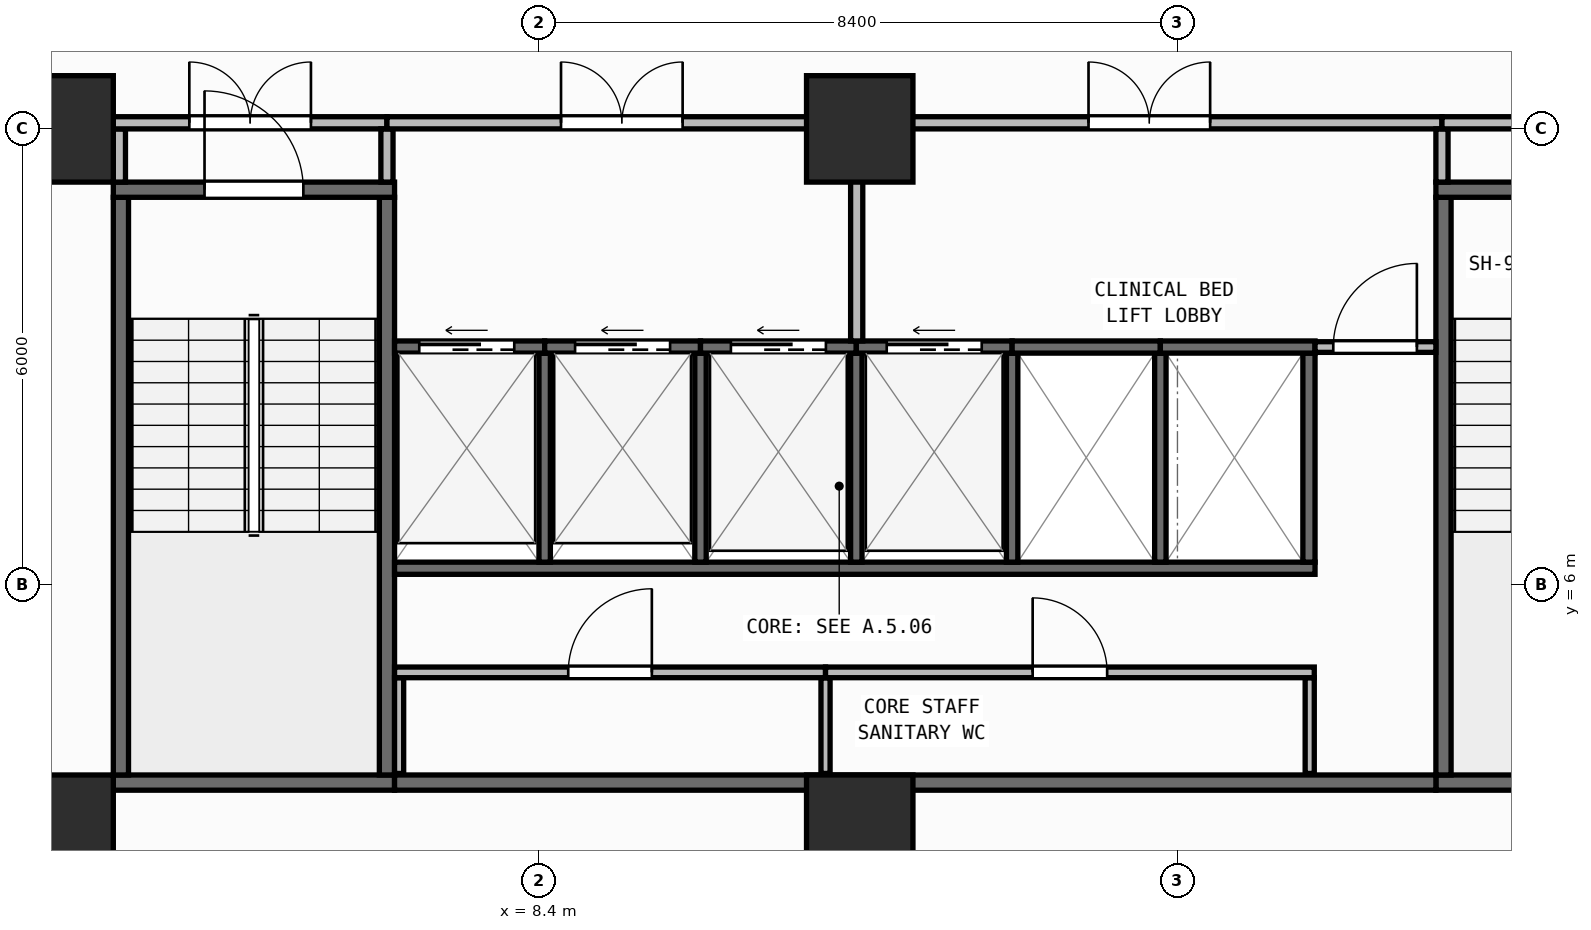
"""IFC4 building model, lengths in metres.
Left out: names, types, materials, properties, quantities, classifications, styles, units other than length and angle.
Written with IfcOpenShell. Run it as: python <this file> out.ifc"""

import sys

from ifc_helpers import new_model, si_unit, direction, frame, frame_2d, origin, origin_2d, place, context, subcontext, project, spatial, rectangle, extrude, element, fill, save


model = new_model("IFC4")
c1 = context("Model", 3, precision=1e-05, world=origin(), true_north=direction((0.0, 1.0)))
c2 = subcontext(c1, "Body", "Model", "MODEL_VIEW")
j1 = project(units=[si_unit("LENGTHUNIT", "METRE"), si_unit("PLANEANGLEUNIT", "RADIAN")], contexts=[c1])
p1 = place(None, origin())
s1 = spatial("IfcSite", under=j1, at=p1, CompositionType="ELEMENT")
p2 = place(p1, origin())
s2 = spatial("IfcBuilding", under=s1, at=p2, CompositionType="ELEMENT")
p3 = place(p2, frame((0.0, 0.0, 54.1)))
s3 = spatial("IfcBuildingStorey", under=s2, at=p3, CompositionType="ELEMENT", Elevation=54.1)
for number, where, z_axis, x_axis in (
    (1, (2.1, 2.8, 0.0), (0.0, 0.0, 1.0), (1.0, 0.0, 0.0)),
    (2, (12.62, 2.8, 0.0), (0.0, 0.0, 1.0), (1.0, 0.0, 0.0)),
    (3, (2.1, 12.0, 0.0), (0.0, 0.0, 1.0), (1.0, 0.0, 0.0)),
    (4, (12.62, 12.0, 0.0), (0.0, 0.0, 1.0), (1.0, 0.0, 0.0)),
):
    element("IfcColumn", number, at=place(p3, frame(where, z_axis=z_axis, x_axis=x_axis)), inside=s3, PredefinedType="COLUMN", context=c2, shape_type="SweptSolid", body=[
        extrude(rectangle(XDim=1.4, YDim=1.4, at=origin_2d()), origin(), (0.0, 0.0, 1.0), 3.95),
    ])
p4 = place(p3, frame((2.76, 0.174, 0.0), z_axis=(0.0, 0.0, 1.0), x_axis=(0.996571478456, 0.082736257641, 0.0)))
e5 = element("IfcWall", 5, at=p4, inside=s3, PredefinedType="STANDARD", context=c2, shape_type="SweptSolid", body=[
    extrude(rectangle(XDim=52.861, YDim=0.26, at=frame_2d((26.431, 0.0))), origin(), (0.0, 0.0, 1.0), 3.71),
])
p5 = place(p4, frame((25.231, 0.0, 0.9)))
e6 = element("IfcOpeningElement", 6, at=p5, cuts=e5, PredefinedType="OPENING", context=c2, shape_type="SweptSolid", body=[
    extrude(rectangle(XDim=2.4, YDim=1.65, at=frame_2d((1.2, 0.825))), frame((0.0, 0.14, 0.0), z_axis=(0.0, -1.0, 0.0), x_axis=(1.0, 0.0, 0.0)), (0.0, 0.0, 1.0), 0.28),
])
p6 = place(p3, frame((2.8, 3.4, 0.0), z_axis=(0.0, 0.0, 1.0), x_axis=(1.0, 0.0, 0.0)))
e7 = element("IfcWall", 7, at=p6, inside=s3, PredefinedType="SHEAR", context=c2, shape_type="SweptSolid", body=[
    extrude(rectangle(XDim=3.7, YDim=0.2, at=frame_2d((1.85, 0.0))), origin(), (0.0, 0.0, 1.0), 3.71),
])
for number, where, z_axis, x_axis in (
    (8, (2.9, 3.5, 0.0), (0.0, 0.0, 1.0), (0.0, 1.0, 0.0)),
    (9, (6.4, 3.5, 0.0), (0.0, 0.0, 1.0), (0.0, 1.0, 0.0)),
):
    element("IfcWall", number, at=place(p3, frame(where, z_axis=z_axis, x_axis=x_axis)), inside=s3, PredefinedType="SHEAR", context=c2, shape_type="SweptSolid", body=[
        extrude(rectangle(XDim=7.6, YDim=0.2, at=frame_2d((3.8, 0.0))), origin(), (0.0, 0.0, 1.0), 3.71),
    ])
p7 = place(p3, frame((2.8, 11.2, 0.0), z_axis=(0.0, 0.0, 1.0), x_axis=(1.0, 0.0, 0.0)))
e10 = element("IfcWall", 10, at=p7, inside=s3, PredefinedType="SHEAR", context=c2, shape_type="SweptSolid", body=[
    extrude(rectangle(XDim=3.7, YDim=0.2, at=frame_2d((1.85, 0.0))), origin(), (0.0, 0.0, 1.0), 3.71),
])
p8 = place(p7, frame((1.2, 0.0, 0.0)))
e11 = element("IfcOpeningElement", 11, at=p8, cuts=e10, PredefinedType="OPENING", context=c2, shape_type="SweptSolid", body=[
    extrude(rectangle(XDim=1.3, YDim=2.15, at=frame_2d((0.65, 1.075))), frame((0.0, 0.11, 0.0), z_axis=(0.0, -1.0, 0.0), x_axis=(1.0, 0.0, 0.0)), (0.0, 0.0, 1.0), 0.22),
])
p9 = place(p3, frame((20.2, 3.4, 0.0), z_axis=(0.0, 0.0, 1.0), x_axis=(1.0, 0.0, 0.0)))
e12 = element("IfcWall", 12, at=p9, inside=s3, PredefinedType="SHEAR", context=c2, shape_type="SweptSolid", body=[
    extrude(rectangle(XDim=3.7, YDim=0.2, at=frame_2d((1.85, 0.0))), origin(), (0.0, 0.0, 1.0), 3.71),
])
p10 = place(p3, frame((20.3, 3.5, 0.0), z_axis=(0.0, 0.0, 1.0), x_axis=(0.0, 1.0, 0.0)))
e13 = element("IfcWall", 13, at=p10, inside=s3, PredefinedType="SHEAR", context=c2, shape_type="SweptSolid", body=[
    extrude(rectangle(XDim=7.6, YDim=0.2, at=frame_2d((3.8, 0.0))), origin(), (0.0, 0.0, 1.0), 3.71),
])
p11 = place(p3, frame((20.2, 11.2, 0.0), z_axis=(0.0, 0.0, 1.0), x_axis=(1.0, 0.0, 0.0)))
e14 = element("IfcWall", 14, at=p11, inside=s3, PredefinedType="SHEAR", context=c2, shape_type="SweptSolid", body=[
    extrude(rectangle(XDim=3.7, YDim=0.2, at=frame_2d((1.85, 0.0))), origin(), (0.0, 0.0, 1.0), 3.71),
])
p12 = place(p11, frame((1.2, 0.0, 0.0)))
e15 = element("IfcOpeningElement", 15, at=p12, cuts=e14, PredefinedType="OPENING", context=c2, shape_type="SweptSolid", body=[
    extrude(rectangle(XDim=1.3, YDim=2.15, at=frame_2d((0.65, 1.075))), frame((0.0, 0.11, 0.0), z_axis=(0.0, -1.0, 0.0), x_axis=(1.0, 0.0, 0.0)), (0.0, 0.0, 1.0), 0.22),
])
p13 = place(p3, frame((6.5, 3.4, 0.0), z_axis=(0.0, 0.0, 1.0), x_axis=(1.0, 0.0, 0.0)))
e16 = element("IfcWall", 16, at=p13, inside=s3, PredefinedType="SHEAR", context=c2, shape_type="SweptSolid", body=[
    extrude(rectangle(XDim=13.7, YDim=0.2, at=frame_2d((6.85, 0.0))), origin(), (0.0, 0.0, 1.0), 3.71),
])
p14 = place(p3, frame((6.5, 6.22, 0.0), z_axis=(0.0, 0.0, 1.0), x_axis=(1.0, 0.0, 0.0)))
e17 = element("IfcWall", 17, at=p14, inside=s3, PredefinedType="SHEAR", context=c2, shape_type="SweptSolid", body=[
    extrude(rectangle(XDim=12.11, YDim=0.16, at=frame_2d((6.055, 0.0))), origin(), (0.0, 0.0, 1.0), 3.71),
])
p15 = place(p3, frame((18.53, 6.3, 0.0), z_axis=(0.0, 0.0, 1.0), x_axis=(0.0, 1.0, 0.0)))
e18 = element("IfcWall", 18, at=p15, inside=s3, PredefinedType="SHEAR", context=c2, shape_type="SweptSolid", body=[
    extrude(rectangle(XDim=2.75, YDim=0.16, at=frame_2d((1.375, 0.0))), origin(), (0.0, 0.0, 1.0), 3.71),
])
for number, where, z_axis, x_axis in (
    (19, (8.475, 6.3, 0.0), (0.0, 0.0, 1.0), (0.0, 1.0, 0.0)),
    (20, (10.525, 6.3, 0.0), (0.0, 0.0, 1.0), (0.0, 1.0, 0.0)),
    (21, (12.575, 6.3, 0.0), (0.0, 0.0, 1.0), (0.0, 1.0, 0.0)),
    (22, (14.625, 6.3, 0.0), (0.0, 0.0, 1.0), (0.0, 1.0, 0.0)),
    (23, (16.575, 6.3, 0.0), (0.0, 0.0, 1.0), (0.0, 1.0, 0.0)),
):
    element("IfcWall", number, at=place(p3, frame(where, z_axis=z_axis, x_axis=x_axis)), inside=s3, PredefinedType="SHEAR", context=c2, shape_type="SweptSolid", body=[
        extrude(rectangle(XDim=2.75, YDim=0.15, at=frame_2d((1.375, 0.0))), origin(), (0.0, 0.0, 1.0), 3.71),
    ])
p16 = place(p3, frame((6.5, 9.13, 0.0), z_axis=(0.0, 0.0, 1.0), x_axis=(1.0, 0.0, 0.0)))
e24 = element("IfcWall", 24, at=p16, inside=s3, PredefinedType="SHEAR", context=c2, shape_type="SweptSolid", body=[
    extrude(rectangle(XDim=1.975, YDim=0.16, at=frame_2d((0.988, 0.0))), origin(), (0.0, 0.0, 1.0), 3.71),
])
p17 = place(p16, frame((0.325, 0.0, 0.0)))
e25 = element("IfcOpeningElement", 25, at=p17, cuts=e24, PredefinedType="OPENING", context=c2, shape_type="SweptSolid", body=[
    extrude(rectangle(XDim=1.25, YDim=2.15, at=frame_2d((0.625, 1.075))), frame((0.0, 0.09, 0.0), z_axis=(0.0, -1.0, 0.0), x_axis=(1.0, 0.0, 0.0)), (0.0, 0.0, 1.0), 0.18),
])
p18 = place(p3, frame((8.475, 9.13, 0.0), z_axis=(0.0, 0.0, 1.0), x_axis=(1.0, 0.0, 0.0)))
e26 = element("IfcWall", 26, at=p18, inside=s3, PredefinedType="SHEAR", context=c2, shape_type="SweptSolid", body=[
    extrude(rectangle(XDim=2.05, YDim=0.16, at=frame_2d((1.025, 0.0))), origin(), (0.0, 0.0, 1.0), 3.71),
])
p19 = place(p18, frame((0.4, 0.0, 0.0)))
e27 = element("IfcOpeningElement", 27, at=p19, cuts=e26, PredefinedType="OPENING", context=c2, shape_type="SweptSolid", body=[
    extrude(rectangle(XDim=1.25, YDim=2.15, at=frame_2d((0.625, 1.075))), frame((0.0, 0.09, 0.0), z_axis=(0.0, -1.0, 0.0), x_axis=(1.0, 0.0, 0.0)), (0.0, 0.0, 1.0), 0.18),
])
p20 = place(p3, frame((10.525, 9.13, 0.0), z_axis=(0.0, 0.0, 1.0), x_axis=(1.0, 0.0, 0.0)))
e28 = element("IfcWall", 28, at=p20, inside=s3, PredefinedType="SHEAR", context=c2, shape_type="SweptSolid", body=[
    extrude(rectangle(XDim=2.05, YDim=0.16, at=frame_2d((1.025, 0.0))), origin(), (0.0, 0.0, 1.0), 3.71),
])
p21 = place(p20, frame((0.4, 0.0, 0.0)))
e29 = element("IfcOpeningElement", 29, at=p21, cuts=e28, PredefinedType="OPENING", context=c2, shape_type="SweptSolid", body=[
    extrude(rectangle(XDim=1.25, YDim=2.15, at=frame_2d((0.625, 1.075))), frame((0.0, 0.09, 0.0), z_axis=(0.0, -1.0, 0.0), x_axis=(1.0, 0.0, 0.0)), (0.0, 0.0, 1.0), 0.18),
])
p22 = place(p3, frame((12.575, 9.13, 0.0), z_axis=(0.0, 0.0, 1.0), x_axis=(1.0, 0.0, 0.0)))
e30 = element("IfcWall", 30, at=p22, inside=s3, PredefinedType="SHEAR", context=c2, shape_type="SweptSolid", body=[
    extrude(rectangle(XDim=2.05, YDim=0.16, at=frame_2d((1.025, 0.0))), origin(), (0.0, 0.0, 1.0), 3.71),
])
p23 = place(p22, frame((0.4, 0.0, 0.0)))
e31 = element("IfcOpeningElement", 31, at=p23, cuts=e30, PredefinedType="OPENING", context=c2, shape_type="SweptSolid", body=[
    extrude(rectangle(XDim=1.25, YDim=2.15, at=frame_2d((0.625, 1.075))), frame((0.0, 0.09, 0.0), z_axis=(0.0, -1.0, 0.0), x_axis=(1.0, 0.0, 0.0)), (0.0, 0.0, 1.0), 0.18),
])
p24 = place(p3, frame((14.625, 9.13, 0.0), z_axis=(0.0, 0.0, 1.0), x_axis=(1.0, 0.0, 0.0)))
e32 = element("IfcWall", 32, at=p24, inside=s3, PredefinedType="SHEAR", context=c2, shape_type="SweptSolid", body=[
    extrude(rectangle(XDim=1.95, YDim=0.16, at=frame_2d((0.975, 0.0))), origin(), (0.0, 0.0, 1.0), 3.71),
])
p25 = place(p3, frame((16.575, 9.13, 0.0), z_axis=(0.0, 0.0, 1.0), x_axis=(1.0, 0.0, 0.0)))
e33 = element("IfcWall", 33, at=p25, inside=s3, PredefinedType="SHEAR", context=c2, shape_type="SweptSolid", body=[
    extrude(rectangle(XDim=2.035, YDim=0.16, at=frame_2d((1.018, 0.0))), origin(), (0.0, 0.0, 1.0), 3.71),
])
for number, where, z_axis, x_axis in (
    (34, (6.56, 3.52, 0.0), (0.0, 0.0, 1.0), (0.0, 1.0, 0.0)),
    (35, (12.17, 3.52, 0.0), (0.0, 0.0, 1.0), (0.0, 1.0, 0.0)),
    (36, (18.54, 3.52, 0.0), (0.0, 0.0, 1.0), (0.0, 1.0, 0.0)),
):
    element("IfcWall", number, at=place(p3, frame(where, z_axis=z_axis, x_axis=x_axis)), inside=s3, PredefinedType="PARTITIONING", context=c2, shape_type="SweptSolid", body=[
        extrude(rectangle(XDim=1.26, YDim=0.12, at=frame_2d((0.63, 0.0))), origin(), (0.0, 0.0, 1.0), 3.71),
    ])
p26 = place(p3, frame((6.5, 4.85, 0.0), z_axis=(0.0, 0.0, 1.0), x_axis=(1.0, 0.0, 0.0)))
e37 = element("IfcWall", 37, at=p26, inside=s3, PredefinedType="PARTITIONING", context=c2, shape_type="SweptSolid", body=[
    extrude(rectangle(XDim=5.67, YDim=0.14, at=frame_2d((2.835, 0.0))), origin(), (0.0, 0.0, 1.0), 3.71),
])
p27 = place(p26, frame((2.285, 0.0, 0.0)))
e38 = element("IfcOpeningElement", 38, at=p27, cuts=e37, PredefinedType="OPENING", context=c2, shape_type="SweptSolid", body=[
    extrude(rectangle(XDim=1.1, YDim=2.1, at=frame_2d((0.55, 1.05))), frame((0.0, 0.08, 0.0), z_axis=(0.0, -1.0, 0.0), x_axis=(1.0, 0.0, 0.0)), (0.0, 0.0, 1.0), 0.16),
])
p28 = place(p3, frame((12.17, 4.85, 0.0), z_axis=(0.0, 0.0, 1.0), x_axis=(1.0, 0.0, 0.0)))
e39 = element("IfcWall", 39, at=p28, inside=s3, PredefinedType="PARTITIONING", context=c2, shape_type="SweptSolid", body=[
    extrude(rectangle(XDim=6.43, YDim=0.14, at=frame_2d((3.215, 0.0))), origin(), (0.0, 0.0, 1.0), 3.71),
])
p29 = place(p28, frame((2.725, 0.0, 0.0)))
e40 = element("IfcOpeningElement", 40, at=p29, cuts=e39, PredefinedType="OPENING", context=c2, shape_type="SweptSolid", body=[
    extrude(rectangle(XDim=0.98, YDim=2.1, at=frame_2d((0.49, 1.05))), frame((0.0, 0.08, 0.0), z_axis=(0.0, -1.0, 0.0), x_axis=(1.0, 0.0, 0.0)), (0.0, 0.0, 1.0), 0.16),
])
p30 = place(p3, frame((18.61, 9.13, 0.0), z_axis=(0.0, 0.0, 1.0), x_axis=(1.0, 0.0, 0.0)))
e41 = element("IfcWall", 41, at=p30, inside=s3, PredefinedType="PARTITIONING", context=c2, shape_type="SweptSolid", body=[
    extrude(rectangle(XDim=1.59, YDim=0.14, at=frame_2d((0.795, 0.0))), origin(), (0.0, 0.0, 1.0), 3.71),
])
p31 = place(p30, frame((0.24, 0.0, 0.0)))
e42 = element("IfcOpeningElement", 42, at=p31, cuts=e41, PredefinedType="OPENING", context=c2, shape_type="SweptSolid", body=[
    extrude(rectangle(XDim=1.1, YDim=2.1, at=frame_2d((0.55, 1.05))), frame((0.0, 0.08, 0.0), z_axis=(0.0, -1.0, 0.0), x_axis=(1.0, 0.0, 0.0)), (0.0, 0.0, 1.0), 0.16),
])
p32 = place(p3, frame((2.88, 11.3, 0.0), z_axis=(0.0, 0.0, 1.0), x_axis=(0.0, 1.0, 0.0)))
e43 = element("IfcWall", 43, at=p32, inside=s3, PredefinedType="PARTITIONING", context=c2, shape_type="SweptSolid", body=[
    extrude(rectangle(XDim=0.7, YDim=0.16, at=frame_2d((0.35, 0.0))), origin(), (0.0, 0.0, 1.0), 3.71),
])
p33 = place(p3, frame((2.8, 12.08, 0.0), z_axis=(0.0, 0.0, 1.0), x_axis=(1.0, 0.0, 0.0)))
e44 = element("IfcWall", 44, at=p33, inside=s3, PredefinedType="PARTITIONING", context=c2, shape_type="SweptSolid", body=[
    extrude(rectangle(XDim=3.6, YDim=0.16, at=frame_2d((1.8, 0.0))), origin(), (0.0, 0.0, 1.0), 3.073),
])
p34 = place(p33, frame((1.0, 0.0, 0.0)))
e45 = element("IfcOpeningElement", 45, at=p34, cuts=e44, PredefinedType="OPENING", context=c2, shape_type="SweptSolid", body=[
    extrude(rectangle(XDim=1.6, YDim=2.05, at=frame_2d((0.8, 1.025))), frame((0.0, 0.09, 0.0), z_axis=(0.0, -1.0, 0.0), x_axis=(1.0, 0.0, 0.0)), (0.0, 0.0, 1.0), 0.18),
])
p35 = place(p3, frame((6.4, 11.3, 0.0), z_axis=(0.0, 0.0, 1.0), x_axis=(0.0, 1.0, 0.0)))
e46 = element("IfcWall", 46, at=p35, inside=s3, PredefinedType="PARTITIONING", context=c2, shape_type="SweptSolid", body=[
    extrude(rectangle(XDim=0.7, YDim=0.16, at=frame_2d((0.35, 0.0))), origin(), (0.0, 0.0, 1.0), 3.71),
])
p36 = place(p3, frame((6.4, 12.08, 0.0), z_axis=(0.0, 0.0, 1.0), x_axis=(1.0, 0.0, 0.0)))
e47 = element("IfcWall", 47, at=p36, inside=s3, PredefinedType="PARTITIONING", context=c2, shape_type="SweptSolid", body=[
    extrude(rectangle(XDim=6.18, YDim=0.16, at=frame_2d((3.09, 0.0))), origin(), (0.0, 0.0, 1.0), 3.073),
])
p37 = place(p36, frame((2.29, 0.0, 0.0)))
e48 = element("IfcOpeningElement", 48, at=p37, cuts=e47, PredefinedType="OPENING", context=c2, shape_type="SweptSolid", body=[
    extrude(rectangle(XDim=1.6, YDim=2.05, at=frame_2d((0.8, 1.025))), frame((0.0, 0.09, 0.0), z_axis=(0.0, -1.0, 0.0), x_axis=(1.0, 0.0, 0.0)), (0.0, 0.0, 1.0), 0.18),
])
p38 = place(p3, frame((12.58, 9.21, 0.0), z_axis=(0.0, 0.0, 1.0), x_axis=(0.0, 1.0, 0.0)))
e49 = element("IfcWall", 49, at=p38, inside=s3, PredefinedType="PARTITIONING", context=c2, shape_type="SweptSolid", body=[
    extrude(rectangle(XDim=2.79, YDim=0.16, at=frame_2d((1.395, 0.0))), origin(), (0.0, 0.0, 1.0), 3.71),
])
p39 = place(p3, frame((12.58, 12.08, 0.0), z_axis=(0.0, 0.0, 1.0), x_axis=(1.0, 0.0, 0.0)))
e50 = element("IfcWall", 50, at=p39, inside=s3, PredefinedType="PARTITIONING", context=c2, shape_type="SweptSolid", body=[
    extrude(rectangle(XDim=7.7, YDim=0.16, at=frame_2d((3.85, 0.0))), origin(), (0.0, 0.0, 1.0), 3.073),
])
p40 = place(p39, frame((3.05, 0.0, 0.0)))
e51 = element("IfcOpeningElement", 51, at=p40, cuts=e50, PredefinedType="OPENING", context=c2, shape_type="SweptSolid", body=[
    extrude(rectangle(XDim=1.6, YDim=2.05, at=frame_2d((0.8, 1.025))), frame((0.0, 0.09, 0.0), z_axis=(0.0, -1.0, 0.0), x_axis=(1.0, 0.0, 0.0)), (0.0, 0.0, 1.0), 0.18),
])
p41 = place(p3, frame((20.28, 11.3, 0.0), z_axis=(0.0, 0.0, 1.0), x_axis=(0.0, 1.0, 0.0)))
e52 = element("IfcWall", 52, at=p41, inside=s3, PredefinedType="PARTITIONING", context=c2, shape_type="SweptSolid", body=[
    extrude(rectangle(XDim=0.7, YDim=0.16, at=frame_2d((0.35, 0.0))), origin(), (0.0, 0.0, 1.0), 3.71),
])
p42 = place(p3, frame((20.28, 12.08, 0.0), z_axis=(0.0, 0.0, 1.0), x_axis=(1.0, 0.0, 0.0)))
e53 = element("IfcWall", 53, at=p42, inside=s3, PredefinedType="PARTITIONING", context=c2, shape_type="SweptSolid", body=[
    extrude(rectangle(XDim=3.62, YDim=0.16, at=frame_2d((1.81, 0.0))), origin(), (0.0, 0.0, 1.0), 3.073),
])
p43 = place(p42, frame((1.01, 0.0, 0.0)))
e54 = element("IfcOpeningElement", 54, at=p43, cuts=e53, PredefinedType="OPENING", context=c2, shape_type="SweptSolid", body=[
    extrude(rectangle(XDim=1.6, YDim=2.05, at=frame_2d((0.8, 1.025))), frame((0.0, 0.09, 0.0), z_axis=(0.0, -1.0, 0.0), x_axis=(1.0, 0.0, 0.0)), (0.0, 0.0, 1.0), 0.18),
])
p44 = place(p8, origin())
e55 = element("IfcDoor", 55, at=p44, inside=s3, OperationType="SINGLE_SWING_LEFT", PredefinedType="DOOR", context=c2, shape_type="SweptSolid", body=[
    extrude(rectangle(XDim=1.3, YDim=2.15, at=frame_2d((0.65, 1.075))), frame((0.0, 0.025, 0.0), z_axis=(0.0, -1.0, 0.0), x_axis=(1.0, 0.0, 0.0)), (0.0, 0.0, 1.0), 0.05),
])
fill(e11, e55)
p45 = place(p17, origin())
e56 = element("IfcDoor", 56, at=p45, inside=s3, OperationType="SLIDING_TO_LEFT", PredefinedType="DOOR", context=c2, shape_type="SweptSolid", body=[
    extrude(rectangle(XDim=1.25, YDim=2.15, at=frame_2d((0.625, 1.075))), frame((0.0, 0.025, 0.0), z_axis=(0.0, -1.0, 0.0), x_axis=(1.0, 0.0, 0.0)), (0.0, 0.0, 1.0), 0.05),
])
fill(e25, e56)
p46 = place(p19, origin())
e57 = element("IfcDoor", 57, at=p46, inside=s3, OperationType="SLIDING_TO_LEFT", PredefinedType="DOOR", context=c2, shape_type="SweptSolid", body=[
    extrude(rectangle(XDim=1.25, YDim=2.15, at=frame_2d((0.625, 1.075))), frame((0.0, 0.025, 0.0), z_axis=(0.0, -1.0, 0.0), x_axis=(1.0, 0.0, 0.0)), (0.0, 0.0, 1.0), 0.05),
])
fill(e27, e57)
p47 = place(p21, origin())
e58 = element("IfcDoor", 58, at=p47, inside=s3, OperationType="SLIDING_TO_LEFT", PredefinedType="DOOR", context=c2, shape_type="SweptSolid", body=[
    extrude(rectangle(XDim=1.25, YDim=2.15, at=frame_2d((0.625, 1.075))), frame((0.0, 0.025, 0.0), z_axis=(0.0, -1.0, 0.0), x_axis=(1.0, 0.0, 0.0)), (0.0, 0.0, 1.0), 0.05),
])
fill(e29, e58)
p48 = place(p23, origin())
e59 = element("IfcDoor", 59, at=p48, inside=s3, OperationType="SLIDING_TO_LEFT", PredefinedType="DOOR", context=c2, shape_type="SweptSolid", body=[
    extrude(rectangle(XDim=1.25, YDim=2.15, at=frame_2d((0.625, 1.075))), frame((0.0, 0.025, 0.0), z_axis=(0.0, -1.0, 0.0), x_axis=(1.0, 0.0, 0.0)), (0.0, 0.0, 1.0), 0.05),
])
fill(e31, e59)
p49 = place(p27, origin())
e60 = element("IfcDoor", 60, at=p49, inside=s3, OperationType="SINGLE_SWING_RIGHT", PredefinedType="DOOR", context=c2, shape_type="SweptSolid", body=[
    extrude(rectangle(XDim=1.1, YDim=2.1, at=frame_2d((0.55, 1.05))), frame((0.0, 0.025, 0.0), z_axis=(0.0, -1.0, 0.0), x_axis=(1.0, 0.0, 0.0)), (0.0, 0.0, 1.0), 0.05),
])
fill(e38, e60)
p50 = place(p29, origin())
e61 = element("IfcDoor", 61, at=p50, inside=s3, OperationType="SINGLE_SWING_LEFT", PredefinedType="DOOR", context=c2, shape_type="SweptSolid", body=[
    extrude(rectangle(XDim=0.98, YDim=2.1, at=frame_2d((0.49, 1.05))), frame((0.0, 0.025, 0.0), z_axis=(0.0, -1.0, 0.0), x_axis=(1.0, 0.0, 0.0)), (0.0, 0.0, 1.0), 0.05),
])
fill(e40, e61)
p51 = place(p31, origin())
e62 = element("IfcDoor", 62, at=p51, inside=s3, OperationType="SINGLE_SWING_RIGHT", PredefinedType="DOOR", context=c2, shape_type="SweptSolid", body=[
    extrude(rectangle(XDim=1.1, YDim=2.1, at=frame_2d((0.55, 1.05))), frame((0.0, 0.025, 0.0), z_axis=(0.0, -1.0, 0.0), x_axis=(1.0, 0.0, 0.0)), (0.0, 0.0, 1.0), 0.05),
])
fill(e42, e62)
p52 = place(p34, origin())
e63 = element("IfcDoor", 63, at=p52, inside=s3, OperationType="DOUBLE_DOOR_SINGLE_SWING", PredefinedType="DOOR", context=c2, shape_type="SweptSolid", body=[
    extrude(rectangle(XDim=1.6, YDim=2.05, at=frame_2d((0.8, 1.025))), frame((0.0, 0.025, 0.0), z_axis=(0.0, -1.0, 0.0), x_axis=(1.0, 0.0, 0.0)), (0.0, 0.0, 1.0), 0.05),
])
fill(e45, e63)
p53 = place(p37, origin())
e64 = element("IfcDoor", 64, at=p53, inside=s3, OperationType="DOUBLE_DOOR_SINGLE_SWING", PredefinedType="DOOR", context=c2, shape_type="SweptSolid", body=[
    extrude(rectangle(XDim=1.6, YDim=2.05, at=frame_2d((0.8, 1.025))), frame((0.0, 0.025, 0.0), z_axis=(0.0, -1.0, 0.0), x_axis=(1.0, 0.0, 0.0)), (0.0, 0.0, 1.0), 0.05),
])
fill(e48, e64)
p54 = place(p40, origin())
e65 = element("IfcDoor", 65, at=p54, inside=s3, OperationType="DOUBLE_DOOR_SINGLE_SWING", PredefinedType="DOOR", context=c2, shape_type="SweptSolid", body=[
    extrude(rectangle(XDim=1.6, YDim=2.05, at=frame_2d((0.8, 1.025))), frame((0.0, 0.025, 0.0), z_axis=(0.0, -1.0, 0.0), x_axis=(1.0, 0.0, 0.0)), (0.0, 0.0, 1.0), 0.05),
])
fill(e51, e65)
save(model, sys.argv[1])
